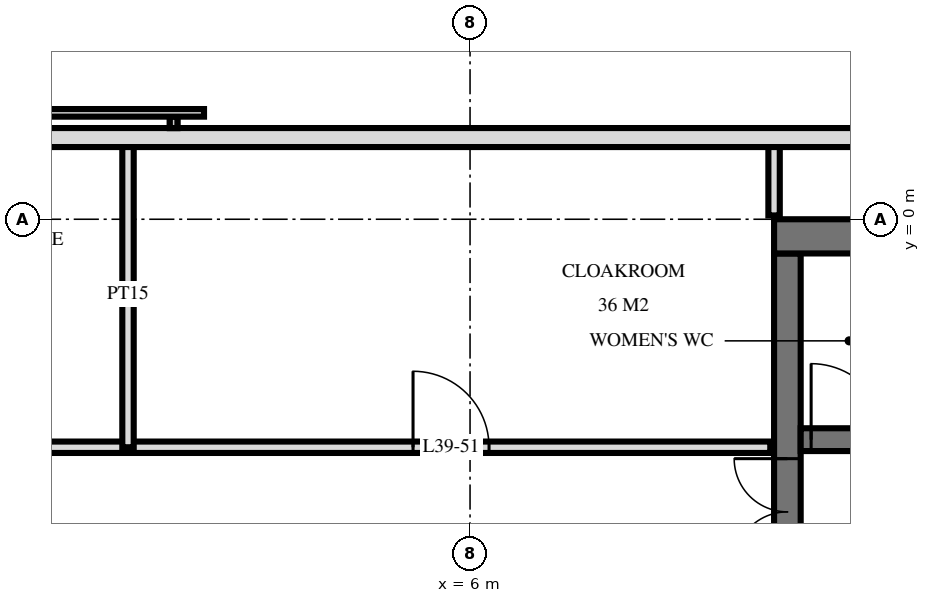
"""IFC4 building model, lengths in metres.
Left out: names, types, materials, properties, quantities, classifications, styles, units other than length and angle.
Written with IfcOpenShell. Run it as: python <this file> out.ifc"""

import sys

from ifc_helpers import new_model, si_unit, direction, frame, frame_2d, origin, place, context, subcontext, project, spatial, rectangle, extrude, element, fill, save


model = new_model("IFC4")
c1 = context("Model", 3, precision=1e-05, world=origin(), true_north=direction((0.0, 1.0)))
c2 = subcontext(c1, "Body", "Model", "MODEL_VIEW")
j1 = project(units=[si_unit("LENGTHUNIT", "METRE"), si_unit("PLANEANGLEUNIT", "RADIAN")], contexts=[c1])
p1 = place(None, origin())
s1 = spatial("IfcSite", under=j1, at=p1, CompositionType="ELEMENT")
p2 = place(p1, origin())
s2 = spatial("IfcBuilding", under=s1, at=p2, CompositionType="ELEMENT")
p3 = place(p2, frame((0.0, 0.0, 152.4)))
s3 = spatial("IfcBuildingStorey", under=s2, at=p3, CompositionType="ELEMENT", Elevation=152.4)
p4 = place(p3, frame((10.0, -0.225, 0.0), z_axis=(0.0, 0.0, 1.0), x_axis=(1.0, 0.0, 0.0)))
e1 = element("IfcWall", 1, at=p4, inside=s3, PredefinedType="SHEAR", context=c2, shape_type="SweptSolid", body=[
    extrude(rectangle(XDim=14.5, YDim=0.45, at=frame_2d((7.25, 0.0))), origin(), (0.0, 0.0, 1.0), 3.6),
])
p5 = place(p3, frame((10.175, -14.55, 0.0), z_axis=(0.0, 0.0, 1.0), x_axis=(0.0, 1.0, 0.0)))
e2 = element("IfcWall", 2, at=p5, inside=s3, PredefinedType="SHEAR", context=c2, shape_type="SweptSolid", body=[
    extrude(rectangle(XDim=14.1, YDim=0.35, at=frame_2d((7.05, 0.0))), origin(), (0.0, 0.0, 1.0), 3.6),
])
p6 = place(p5, frame((8.4, 0.0, 0.0)))
e3 = element("IfcOpeningElement", 3, at=p6, cuts=e2, PredefinedType="OPENING", context=c2, shape_type="SweptSolid", body=[
    extrude(rectangle(XDim=1.4, YDim=2.4, at=frame_2d((0.7, 1.2))), frame((0.0, 0.185, 0.0), z_axis=(0.0, -1.0, 0.0), x_axis=(1.0, 0.0, 0.0)), (0.0, 0.0, 1.0), 0.37),
])
p7 = place(p5, frame((10.0, 0.0, 0.0)))
e4 = element("IfcOpeningElement", 4, at=p7, cuts=e2, PredefinedType="OPENING", context=c2, shape_type="SweptSolid", body=[
    extrude(rectangle(XDim=1.4, YDim=2.4, at=frame_2d((0.7, 1.2))), frame((0.0, 0.185, 0.0), z_axis=(0.0, -1.0, 0.0), x_axis=(1.0, 0.0, 0.0)), (0.0, 0.0, 1.0), 0.37),
])
p8 = place(p5, frame((4.0, 0.0, 0.0)))
e5 = element("IfcOpeningElement", 5, at=p8, cuts=e2, PredefinedType="OPENING", context=c2, shape_type="SweptSolid", body=[
    extrude(rectangle(XDim=1.2, YDim=2.1, at=frame_2d((0.6, 1.05))), frame((0.0, 0.185, 0.0), z_axis=(0.0, -1.0, 0.0), x_axis=(1.0, 0.0, 0.0)), (0.0, 0.0, 1.0), 0.37),
])
p9 = place(p3, frame((10.35, -2.9, 0.0), z_axis=(0.0, 0.0, 1.0), x_axis=(1.0, 0.0, 0.0)))
e6 = element("IfcWall", 6, at=p9, inside=s3, PredefinedType="SHEAR", context=c2, shape_type="SweptSolid", body=[
    extrude(rectangle(XDim=13.7, YDim=0.3, at=frame_2d((6.85, 0.0))), origin(), (0.0, 0.0, 1.0), 3.6),
])
p10 = place(p9, frame((12.05, 0.0, 0.0)))
e7 = element("IfcOpeningElement", 7, at=p10, cuts=e6, PredefinedType="OPENING", context=c2, shape_type="SweptSolid", body=[
    extrude(rectangle(XDim=1.1, YDim=2.1, at=frame_2d((0.55, 1.05))), frame((0.0, 0.16, 0.0), z_axis=(0.0, -1.0, 0.0), x_axis=(1.0, 0.0, 0.0)), (0.0, 0.0, 1.0), 0.32),
])
p11 = place(p9, frame((6.188, 0.0, 0.0)))
e8 = element("IfcOpeningElement", 8, at=p11, cuts=e6, PredefinedType="OPENING", context=c2, shape_type="SweptSolid", body=[
    extrude(rectangle(XDim=0.9, YDim=2.1, at=frame_2d((0.45, 1.05))), frame((0.0, 0.16, 0.0), z_axis=(0.0, -1.0, 0.0), x_axis=(1.0, 0.0, 0.0)), (0.0, 0.0, 1.0), 0.32),
])
p12 = place(p9, frame((7.613, 0.0, 0.0)))
e9 = element("IfcOpeningElement", 9, at=p12, cuts=e6, PredefinedType="OPENING", context=c2, shape_type="SweptSolid", body=[
    extrude(rectangle(XDim=0.9, YDim=2.1, at=frame_2d((0.45, 1.05))), frame((0.0, 0.16, 0.0), z_axis=(0.0, -1.0, 0.0), x_axis=(1.0, 0.0, 0.0)), (0.0, 0.0, 1.0), 0.32),
])
p13 = place(p9, frame((0.137, 0.0, 0.0)))
e10 = element("IfcOpeningElement", 10, at=p13, cuts=e6, PredefinedType="OPENING", context=c2, shape_type="SweptSolid", body=[
    extrude(rectangle(XDim=1.0, YDim=2.1, at=frame_2d((0.5, 1.05))), frame((0.0, 0.16, 0.0), z_axis=(0.0, -1.0, 0.0), x_axis=(1.0, 0.0, 0.0)), (0.0, 0.0, 1.0), 0.32),
])
p14 = place(p9, frame((1.562, 0.0, 0.0)))
e11 = element("IfcOpeningElement", 11, at=p14, cuts=e6, PredefinedType="OPENING", context=c2, shape_type="SweptSolid", body=[
    extrude(rectangle(XDim=1.0, YDim=2.1, at=frame_2d((0.5, 1.05))), frame((0.0, 0.16, 0.0), z_axis=(0.0, -1.0, 0.0), x_axis=(1.0, 0.0, 0.0)), (0.0, 0.0, 1.0), 0.32),
])
p15 = place(p9, frame((3.85, 0.0, 0.0)))
e12 = element("IfcOpeningElement", 12, at=p15, cuts=e6, PredefinedType="OPENING", context=c2, shape_type="SweptSolid", body=[
    extrude(rectangle(XDim=1.0, YDim=2.1, at=frame_2d((0.5, 1.05))), frame((0.0, 0.16, 0.0), z_axis=(0.0, -1.0, 0.0), x_axis=(1.0, 0.0, 0.0)), (0.0, 0.0, 1.0), 0.32),
])
p16 = place(p9, frame((9.7, 0.0, 0.0)))
e13 = element("IfcOpeningElement", 13, at=p16, cuts=e6, PredefinedType="OPENING", context=c2, shape_type="SweptSolid", body=[
    extrude(rectangle(XDim=1.0, YDim=2.1, at=frame_2d((0.5, 1.05))), frame((0.0, 0.16, 0.0), z_axis=(0.0, -1.0, 0.0), x_axis=(1.0, 0.0, 0.0)), (0.0, 0.0, 1.0), 0.32),
])
p17 = place(p3, frame((23.675, 1.075, 0.0), z_axis=(0.0, 0.0, 1.0), x_axis=(-1.0, 0.0, 0.0)))
e14 = element("IfcWall", 14, at=p17, inside=s3, PredefinedType="SOLIDWALL", context=c2, shape_type="SweptSolid", body=[
    extrude(rectangle(XDim=47.351, YDim=0.25, at=frame_2d((23.675, 0.0))), origin(), (0.0, 0.0, 1.0), 3.32),
])
p18 = place(p3, frame((10.0, 0.05, 0.0), z_axis=(0.0, 0.0, 1.0), x_axis=(0.0, 1.0, 0.0)))
e15 = element("IfcWall", 15, at=p18, inside=s3, PredefinedType="PARTITIONING", context=c2, shape_type="SweptSolid", body=[
    extrude(rectangle(XDim=0.97, YDim=0.15, at=frame_2d((0.485, 0.0))), origin(), (0.0, 0.0, 1.0), 3.32),
])
p19 = place(p3, frame((1.5, -3.0, 0.0), z_axis=(0.0, 0.0, 1.0), x_axis=(0.0, 1.0, 0.0)))
e16 = element("IfcWall", 16, at=p19, inside=s3, PredefinedType="PARTITIONING", context=c2, shape_type="SweptSolid", body=[
    extrude(rectangle(XDim=4.02, YDim=0.15, at=frame_2d((2.01, 0.0))), origin(), (0.0, 0.0, 1.0), 3.32),
])
p20 = place(p3, frame((-9.95, -3.0, 0.0), z_axis=(0.0, 0.0, 1.0), x_axis=(1.0, 0.0, 0.0)))
e17 = element("IfcWall", 17, at=p20, inside=s3, PredefinedType="PARTITIONING", context=c2, shape_type="SweptSolid", body=[
    extrude(rectangle(XDim=19.9, YDim=0.15, at=frame_2d((9.95, 0.0))), origin(), (0.0, 0.0, 1.0), 3.32),
])
p21 = place(p20, frame((0.95, 0.0, 0.0)))
e18 = element("IfcOpeningElement", 18, at=p21, cuts=e17, PredefinedType="OPENING", context=c2, shape_type="SweptSolid", body=[
    extrude(rectangle(XDim=1.0, YDim=2.1, at=frame_2d((0.5, 1.05))), frame((0.0, 0.085, 0.0), z_axis=(0.0, -1.0, 0.0), x_axis=(1.0, 0.0, 0.0)), (0.0, 0.0, 1.0), 0.17),
])
p22 = place(p20, frame((3.7, 0.0, 0.0)))
e19 = element("IfcOpeningElement", 19, at=p22, cuts=e17, PredefinedType="OPENING", context=c2, shape_type="SweptSolid", body=[
    extrude(rectangle(XDim=1.0, YDim=2.1, at=frame_2d((0.5, 1.05))), frame((0.0, 0.085, 0.0), z_axis=(0.0, -1.0, 0.0), x_axis=(1.0, 0.0, 0.0)), (0.0, 0.0, 1.0), 0.17),
])
p23 = place(p20, frame((7.95, 0.0, 0.0)))
e20 = element("IfcOpeningElement", 20, at=p23, cuts=e17, PredefinedType="OPENING", context=c2, shape_type="SweptSolid", body=[
    extrude(rectangle(XDim=1.0, YDim=2.1, at=frame_2d((0.5, 1.05))), frame((0.0, 0.085, 0.0), z_axis=(0.0, -1.0, 0.0), x_axis=(1.0, 0.0, 0.0)), (0.0, 0.0, 1.0), 0.17),
])
p24 = place(p20, frame((15.2, 0.0, 0.0)))
e21 = element("IfcOpeningElement", 21, at=p24, cuts=e17, PredefinedType="OPENING", context=c2, shape_type="SweptSolid", body=[
    extrude(rectangle(XDim=1.0, YDim=2.1, at=frame_2d((0.5, 1.05))), frame((0.0, 0.085, 0.0), z_axis=(0.0, -1.0, 0.0), x_axis=(1.0, 0.0, 0.0)), (0.0, 0.0, 1.0), 0.17),
])
p25 = place(p7, origin())
e22 = element("IfcDoor", 22, at=p25, inside=s3, OperationType="DOUBLE_DOOR_SINGLE_SWING", PredefinedType="DOOR", context=c2, shape_type="SweptSolid", body=[
    extrude(rectangle(XDim=1.4, YDim=2.4, at=frame_2d((0.7, 1.2))), frame((0.0, 0.025, 0.0), z_axis=(0.0, -1.0, 0.0), x_axis=(1.0, 0.0, 0.0)), (0.0, 0.0, 1.0), 0.05),
])
fill(e4, e22)
p26 = place(p13, origin())
e23 = element("IfcDoor", 23, at=p26, inside=s3, OperationType="SINGLE_SWING_RIGHT", PredefinedType="DOOR", context=c2, shape_type="SweptSolid", body=[
    extrude(rectangle(XDim=1.0, YDim=2.1, at=frame_2d((0.5, 1.05))), frame((0.0, 0.025, 0.0), z_axis=(0.0, -1.0, 0.0), x_axis=(1.0, 0.0, 0.0)), (0.0, 0.0, 1.0), 0.05),
])
fill(e10, e23)
p27 = place(p24, origin())
e24 = element("IfcDoor", 24, at=p27, inside=s3, OperationType="SINGLE_SWING_RIGHT", PredefinedType="DOOR", context=c2, shape_type="SweptSolid", body=[
    extrude(rectangle(XDim=1.0, YDim=2.1, at=frame_2d((0.5, 1.05))), frame((0.0, 0.025, 0.0), z_axis=(0.0, -1.0, 0.0), x_axis=(1.0, 0.0, 0.0)), (0.0, 0.0, 1.0), 0.05),
])
fill(e21, e24)
save(model, sys.argv[1])
